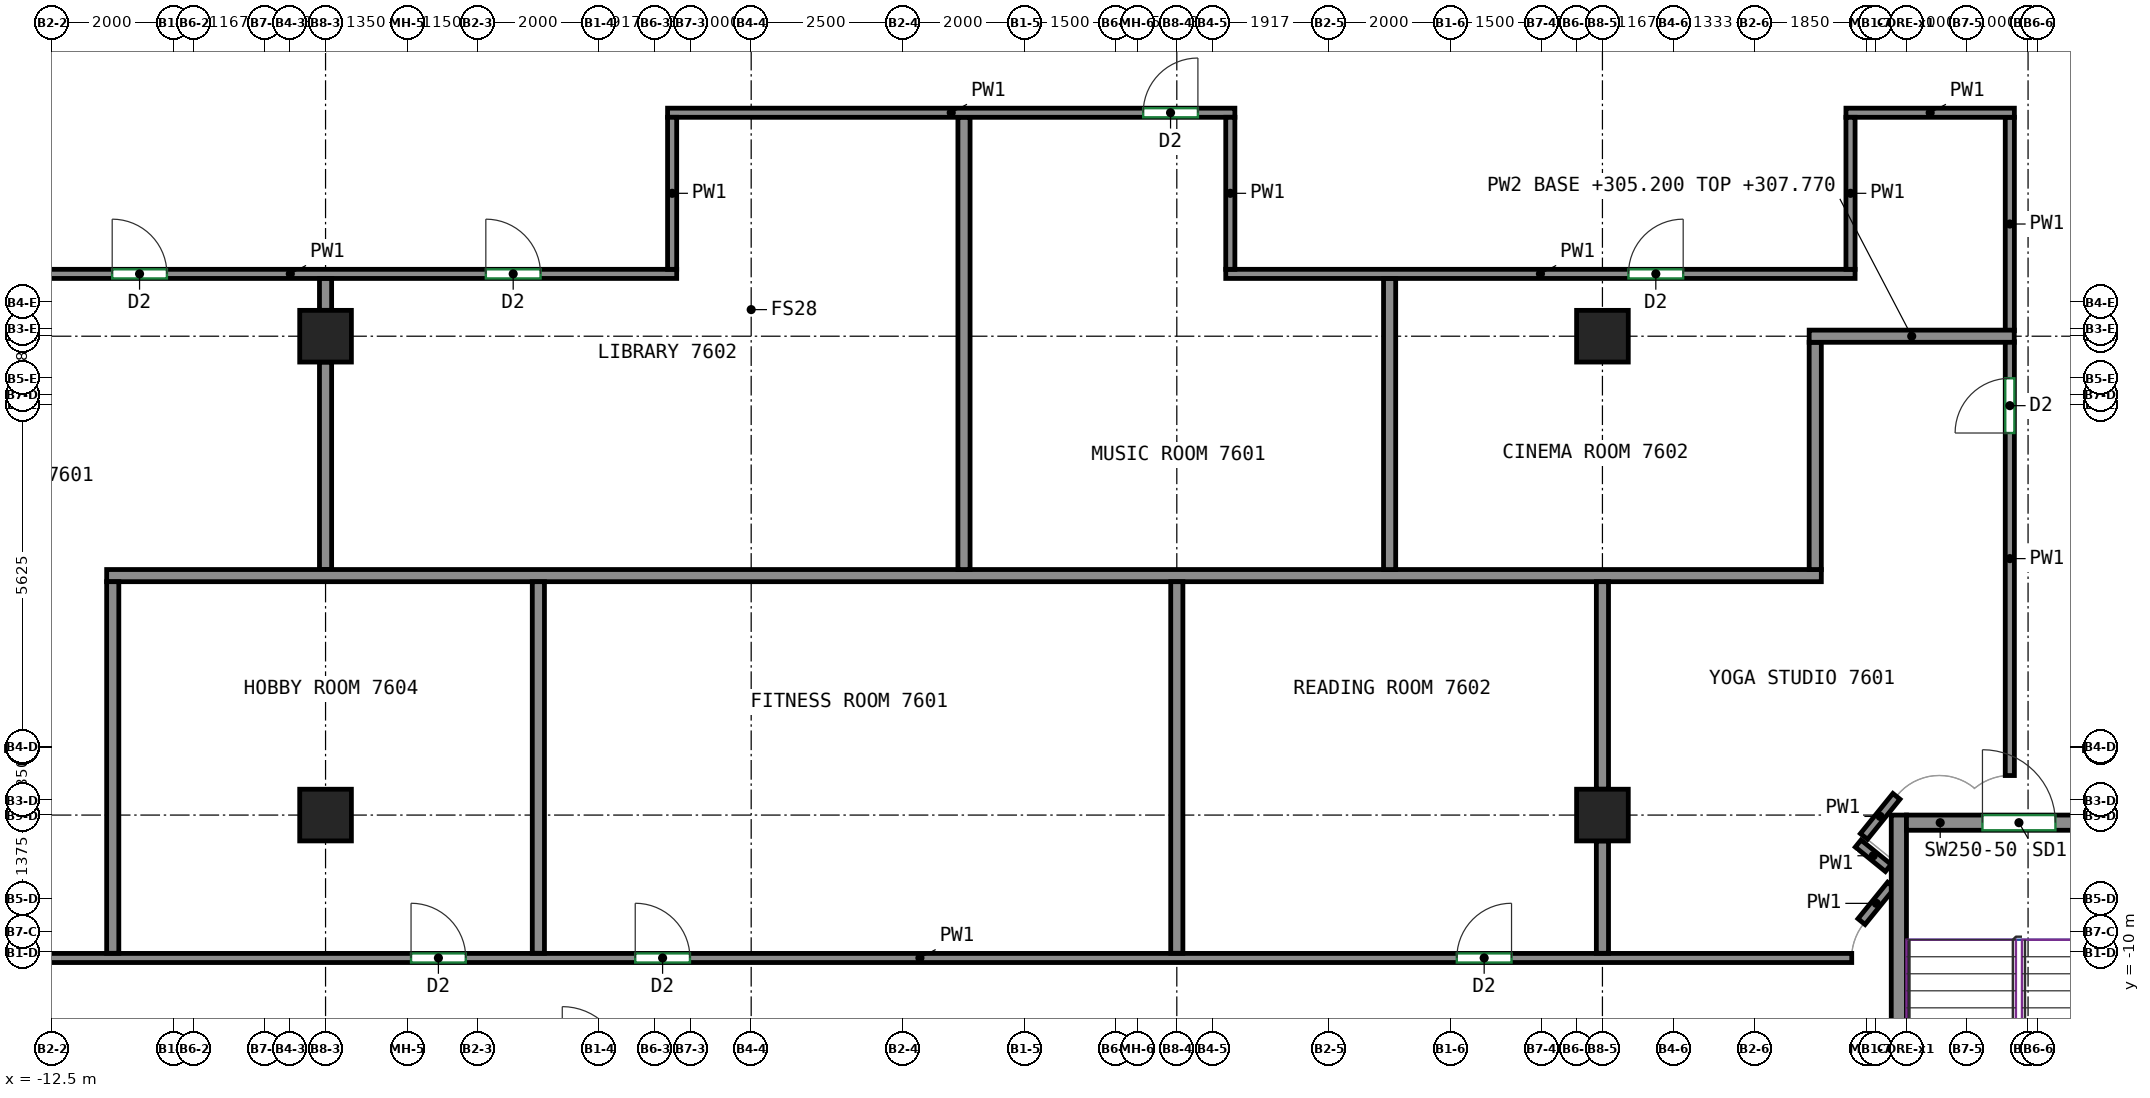
"""IFC4 building model, lengths in metres.
Left out: names, types, materials, properties, quantities, classifications, styles, units other than length and angle.
Written with IfcOpenShell. Run it as: python <this file> out.ifc"""

import sys

from ifc_helpers import new_model, si_unit, direction, frame, frame_2d, origin, origin_2d, place, context, subcontext, project, spatial, rectangle, extrude, source, transform, mapped, element, fill, save


model = new_model("IFC4")
c1 = context("Model", 3, precision=1e-05, world=origin(), true_north=direction((0.0, 1.0)))
c2 = subcontext(c1, "Body", "Model", "MODEL_VIEW")
j1 = project(units=[si_unit("LENGTHUNIT", "METRE"), si_unit("PLANEANGLEUNIT", "RADIAN")], contexts=[c1])
p1 = place(None, origin())
s1 = spatial("IfcSite", under=j1, at=p1, CompositionType="ELEMENT")
p2 = place(p1, origin())
s2 = spatial("IfcBuilding", under=s1, at=p2, CompositionType="ELEMENT")
p3 = place(p2, frame((0.0, 0.0, 305.2)))
s3 = spatial("IfcBuildingStorey", under=s2, at=p3, CompositionType="ELEMENT", Elevation=305.2)
m1 = source(origin(), c2, "Body", "SweptSolid", [
    extrude(rectangle(XDim=0.85, YDim=0.85, at=origin_2d()), origin(), (0.0, 0.0, 1.0), 3.12),
])
for number, where, z_axis, x_axis in (
    (1, (-8.0, -7.75, 0.0), (0.0, 0.0, 1.0), (1.0, 0.0, 0.0)),
    (2, (-8.0, 0.125, 0.0), (0.0, 0.0, 1.0), (1.0, 0.0, 0.0)),
    (3, (13.0, -7.75, 0.0), (0.0, 0.0, 1.0), (1.0, 0.0, 0.0)),
    (4, (13.0, 0.125, 0.0), (0.0, 0.0, 1.0), (1.0, 0.0, 0.0)),
):
    element("IfcColumn", number, at=place(p3, frame(where, z_axis=z_axis, x_axis=x_axis)), inside=s3, PredefinedType="COLUMN", context=c2, shape_type="MappedRepresentation", body=[
        mapped(m1, transform((0.0, 0.0, 0.0))),
    ])
m2 = source(origin(), c2, "Body", "SweptSolid", [
    extrude(rectangle(XDim=8.0, YDim=0.25, at=frame_2d((4.0, 0.0))), origin(), (0.0, 0.0, 1.0), 3.12),
])
p4 = place(p3, frame((17.875, -15.75, 0.0), z_axis=(0.0, 0.0, 1.0), x_axis=(0.0, 1.0, 0.0)))
e5 = element("IfcWall", 5, at=p4, inside=s3, PredefinedType="SHEAR", context=c2, shape_type="MappedRepresentation", body=[
    mapped(m2, transform((0.0, 0.0, 0.0))),
])
m3 = source(origin(), c2, "Body", "SweptSolid", [
    extrude(rectangle(XDim=3.7, YDim=0.25, at=frame_2d((1.85, 0.0))), origin(), (0.0, 0.0, 1.0), 3.12),
])
p5 = place(p3, frame((18.0, -7.875, 0.0), z_axis=(0.0, 0.0, 1.0), x_axis=(1.0, 0.0, 0.0)))
e6 = element("IfcWall", 6, at=p5, inside=s3, PredefinedType="SHEAR", context=c2, shape_type="MappedRepresentation", body=[
    mapped(m3, transform((0.0, 0.0, 0.0))),
])
p6 = place(p5, frame((1.25, 0.0, 0.0)))
e7 = element("IfcOpeningElement", 7, at=p6, cuts=e6, PredefinedType="OPENING", context=c2, shape_type="SweptSolid", body=[
    extrude(rectangle(XDim=1.2, YDim=2.1, at=frame_2d((0.6, 1.05))), frame((0.0, 0.135, 0.0), z_axis=(0.0, -1.0, 0.0), x_axis=(1.0, 0.0, 0.0)), (0.0, 0.0, 1.0), 0.27),
])
p7 = place(p3, frame((-14.935, 1.15, 0.0), z_axis=(0.0, 0.0, 1.0), x_axis=(1.0, 0.0, 0.0)))
e8 = element("IfcWall", 8, at=p7, inside=s3, PredefinedType="PARTITIONING", context=c2, shape_type="SweptSolid", body=[
    extrude(rectangle(XDim=12.71, YDim=0.15, at=frame_2d((6.355, 0.0))), origin(), (0.0, 0.0, 1.0), 3.12),
])
p8 = place(p7, frame((3.426, 0.0, 0.0)))
e9 = element("IfcOpeningElement", 9, at=p8, cuts=e8, PredefinedType="OPENING", context=c2, shape_type="SweptSolid", body=[
    extrude(rectangle(XDim=0.9, YDim=2.1, at=frame_2d((0.45, 1.05))), frame((0.0, 0.085, 0.0), z_axis=(0.0, -1.0, 0.0), x_axis=(1.0, 0.0, 0.0)), (0.0, 0.0, 1.0), 0.17),
])
p9 = place(p7, frame((9.571, 0.0, 0.0)))
e10 = element("IfcOpeningElement", 10, at=p9, cuts=e8, PredefinedType="OPENING", context=c2, shape_type="SweptSolid", body=[
    extrude(rectangle(XDim=0.9, YDim=2.1, at=frame_2d((0.45, 1.05))), frame((0.0, 0.085, 0.0), z_axis=(0.0, -1.0, 0.0), x_axis=(1.0, 0.0, 0.0)), (0.0, 0.0, 1.0), 0.17),
])
p10 = place(p3, frame((-13.55, -10.1, 0.0), z_axis=(0.0, 0.0, 1.0), x_axis=(1.0, 0.0, 0.0)))
e11 = element("IfcWall", 11, at=p10, inside=s3, PredefinedType="PARTITIONING", context=c2, shape_type="SweptSolid", body=[
    extrude(rectangle(XDim=30.65, YDim=0.15, at=frame_2d((15.325, 0.0))), origin(), (0.0, 0.0, 1.0), 3.12),
])
p11 = place(p10, frame((6.956, 0.0, 0.0)))
e12 = element("IfcOpeningElement", 12, at=p11, cuts=e11, PredefinedType="OPENING", context=c2, shape_type="SweptSolid", body=[
    extrude(rectangle(XDim=0.9, YDim=2.1, at=frame_2d((0.45, 1.05))), frame((0.0, 0.085, 0.0), z_axis=(0.0, -1.0, 0.0), x_axis=(1.0, 0.0, 0.0)), (0.0, 0.0, 1.0), 0.17),
])
p12 = place(p10, frame((10.643, 0.0, 0.0)))
e13 = element("IfcOpeningElement", 13, at=p12, cuts=e11, PredefinedType="OPENING", context=c2, shape_type="SweptSolid", body=[
    extrude(rectangle(XDim=0.9, YDim=2.1, at=frame_2d((0.45, 1.05))), frame((0.0, 0.085, 0.0), z_axis=(0.0, -1.0, 0.0), x_axis=(1.0, 0.0, 0.0)), (0.0, 0.0, 1.0), 0.17),
])
p13 = place(p10, frame((24.155, 0.0, 0.0)))
e14 = element("IfcOpeningElement", 14, at=p13, cuts=e11, PredefinedType="OPENING", context=c2, shape_type="SweptSolid", body=[
    extrude(rectangle(XDim=0.9, YDim=2.1, at=frame_2d((0.45, 1.05))), frame((0.0, 0.085, 0.0), z_axis=(0.0, -1.0, 0.0), x_axis=(1.0, 0.0, 0.0)), (0.0, 0.0, 1.0), 0.17),
])
p14 = place(p3, frame((-2.375, 3.8, 0.0), z_axis=(0.0, 0.0, 1.0), x_axis=(1.0, 0.0, 0.0)))
e15 = element("IfcWall", 15, at=p14, inside=s3, PredefinedType="PARTITIONING", context=c2, shape_type="SweptSolid", body=[
    extrude(rectangle(XDim=9.33, YDim=0.15, at=frame_2d((4.665, 0.0))), origin(), (0.0, 0.0, 1.0), 3.12),
])
p15 = place(p14, frame((7.822, 0.0, 0.0)))
e16 = element("IfcOpeningElement", 16, at=p15, cuts=e15, PredefinedType="OPENING", context=c2, shape_type="SweptSolid", body=[
    extrude(rectangle(XDim=0.9, YDim=2.1, at=frame_2d((0.45, 1.05))), frame((0.0, 0.085, 0.0), z_axis=(0.0, -1.0, 0.0), x_axis=(1.0, 0.0, 0.0)), (0.0, 0.0, 1.0), 0.17),
])
p16 = place(p3, frame((-2.3, 1.225, 0.0), z_axis=(0.0, 0.0, 1.0), x_axis=(0.0, 1.0, 0.0)))
e17 = element("IfcWall", 17, at=p16, inside=s3, PredefinedType="PARTITIONING", context=c2, shape_type="SweptSolid", body=[
    extrude(rectangle(XDim=2.5, YDim=0.15, at=frame_2d((1.25, 0.0))), origin(), (0.0, 0.0, 1.0), 3.12),
])
p17 = place(p3, frame((6.805, 1.15, 0.0), z_axis=(0.0, 0.0, 1.0), x_axis=(1.0, 0.0, 0.0)))
e18 = element("IfcWall", 18, at=p17, inside=s3, PredefinedType="PARTITIONING", context=c2, shape_type="SweptSolid", body=[
    extrude(rectangle(XDim=10.35, YDim=0.15, at=frame_2d((5.175, 0.0))), origin(), (0.0, 0.0, 1.0), 3.12),
])
p18 = place(p17, frame((6.623, 0.0, 0.0)))
e19 = element("IfcOpeningElement", 19, at=p18, cuts=e18, PredefinedType="OPENING", context=c2, shape_type="SweptSolid", body=[
    extrude(rectangle(XDim=0.9, YDim=2.1, at=frame_2d((0.45, 1.05))), frame((0.0, 0.085, 0.0), z_axis=(0.0, -1.0, 0.0), x_axis=(1.0, 0.0, 0.0)), (0.0, 0.0, 1.0), 0.17),
])
p19 = place(p3, frame((6.88, 3.725, 0.0), z_axis=(0.0, 0.0, 1.0), x_axis=(0.0, -1.0, 0.0)))
e20 = element("IfcWall", 20, at=p19, inside=s3, PredefinedType="PARTITIONING", context=c2, shape_type="SweptSolid", body=[
    extrude(rectangle(XDim=2.5, YDim=0.15, at=frame_2d((1.25, 0.0))), origin(), (0.0, 0.0, 1.0), 3.12),
])
p20 = place(p3, frame((17.748, -8.902, 0.0), z_axis=(0.0, 0.0, 1.0), x_axis=(-0.630342797145, -0.776316918589, 0.0)))
e21 = element("IfcWall", 21, at=p20, inside=s3, PredefinedType="PARTITIONING", context=c2, shape_type="SweptSolid", body=[
    extrude(rectangle(XDim=0.773, YDim=0.15, at=frame_2d((0.386, 0.0))), origin(), (0.0, 0.0, 1.0), 3.12),
])
p21 = place(p3, frame((17.206, -8.218, 0.0), z_axis=(0.0, 0.0, 1.0), x_axis=(0.776102288291, -0.630607039376, 0.0)))
e22 = element("IfcWall", 22, at=p21, inside=s3, PredefinedType="PARTITIONING", context=c2, shape_type="SweptSolid", body=[
    extrude(rectangle(XDim=0.638, YDim=0.15, at=frame_2d((0.319, 0.0))), origin(), (0.0, 0.0, 1.0), 3.12),
])
p22 = place(p3, frame((17.835, -7.442, 0.0), z_axis=(0.0, 0.0, 1.0), x_axis=(-0.628859024249, -0.777519342281, 0.0)))
e23 = element("IfcWall", 23, at=p22, inside=s3, PredefinedType="PARTITIONING", context=c2, shape_type="SweptSolid", body=[
    extrude(rectangle(XDim=0.849, YDim=0.15, at=frame_2d((0.425, 0.0))), origin(), (0.0, 0.0, 1.0), 3.12),
])
p23 = place(p3, frame((19.7, -7.1, 0.0), z_axis=(0.0, 0.0, 1.0), x_axis=(0.0, 1.0, 0.0)))
e24 = element("IfcWall", 24, at=p23, inside=s3, PredefinedType="PARTITIONING", context=c2, shape_type="SweptSolid", body=[
    extrude(rectangle(XDim=7.135, YDim=0.15, at=frame_2d((3.567, 0.0))), origin(), (0.0, 0.0, 1.0), 3.12),
])
p24 = place(p23, frame((5.633, 0.0, 0.0)))
e25 = element("IfcOpeningElement", 25, at=p24, cuts=e24, PredefinedType="OPENING", context=c2, shape_type="SweptSolid", body=[
    extrude(rectangle(XDim=0.9, YDim=2.1, at=frame_2d((0.45, 1.05))), frame((0.0, 0.085, 0.0), z_axis=(0.0, -1.0, 0.0), x_axis=(1.0, 0.0, 0.0)), (0.0, 0.0, 1.0), 0.17),
])
p25 = place(p3, frame((19.7, 0.215, 0.0), z_axis=(0.0, 0.0, 1.0), x_axis=(0.0, 1.0, 0.0)))
e26 = element("IfcWall", 26, at=p25, inside=s3, PredefinedType="PARTITIONING", context=c2, shape_type="SweptSolid", body=[
    extrude(rectangle(XDim=3.51, YDim=0.15, at=frame_2d((1.755, 0.0))), origin(), (0.0, 0.0, 1.0), 3.12),
])
p26 = place(p3, frame((17.005, 3.8, 0.0), z_axis=(0.0, 0.0, 1.0), x_axis=(1.0, 0.0, 0.0)))
e27 = element("IfcWall", 27, at=p26, inside=s3, PredefinedType="PARTITIONING", context=c2, shape_type="SweptSolid", body=[
    extrude(rectangle(XDim=2.77, YDim=0.15, at=frame_2d((1.385, 0.0))), origin(), (0.0, 0.0, 1.0), 3.12),
])
p27 = place(p3, frame((17.08, 1.225, 0.0), z_axis=(0.0, 0.0, 1.0), x_axis=(0.0, 1.0, 0.0)))
e28 = element("IfcWall", 28, at=p27, inside=s3, PredefinedType="PARTITIONING", context=c2, shape_type="SweptSolid", body=[
    extrude(rectangle(XDim=2.5, YDim=0.15, at=frame_2d((1.25, 0.0))), origin(), (0.0, 0.0, 1.0), 3.12),
])
p28 = place(p3, frame((-8.0, 0.55, 0.0), z_axis=(0.0, 0.0, 1.0), x_axis=(0.0, 1.0, 0.0)))
e29 = element("IfcWall", 29, at=p28, inside=s3, PredefinedType="PARTITIONING", context=c2, shape_type="SweptSolid", body=[
    extrude(rectangle(XDim=0.523, YDim=0.2, at=frame_2d((0.261, 0.0))), origin(), (0.0, 0.0, 1.0), 3.12),
])
p29 = place(p3, frame((-8.0, -3.712, 0.0), z_axis=(0.0, 0.0, 1.0), x_axis=(0.0, 1.0, 0.0)))
e30 = element("IfcWall", 30, at=p29, inside=s3, PredefinedType="PARTITIONING", context=c2, shape_type="SweptSolid", body=[
    extrude(rectangle(XDim=3.412, YDim=0.2, at=frame_2d((1.706, 0.0))), origin(), (0.0, 0.0, 1.0), 3.12),
])
p30 = place(p3, frame((-11.6, -3.812, 0.0), z_axis=(0.0, 0.0, 1.0), x_axis=(1.0, 0.0, 0.0)))
e31 = element("IfcWall", 31, at=p30, inside=s3, PredefinedType="PARTITIONING", context=c2, shape_type="SweptSolid", body=[
    extrude(rectangle(XDim=28.2, YDim=0.2, at=frame_2d((14.1, 0.0))), origin(), (0.0, 0.0, 1.0), 3.12),
])
p31 = place(p3, frame((-11.5, -10.023, 0.0), z_axis=(0.0, 0.0, 1.0), x_axis=(0.0, 1.0, 0.0)))
e32 = element("IfcWall", 32, at=p31, inside=s3, PredefinedType="PARTITIONING", context=c2, shape_type="SweptSolid", body=[
    extrude(rectangle(XDim=6.111, YDim=0.2, at=frame_2d((3.055, 0.0))), origin(), (0.0, 0.0, 1.0), 3.12),
])
p32 = place(p3, frame((2.5, -3.712, 0.0), z_axis=(0.0, 0.0, 1.0), x_axis=(0.0, 1.0, 0.0)))
e33 = element("IfcWall", 33, at=p32, inside=s3, PredefinedType="PARTITIONING", context=c2, shape_type="SweptSolid", body=[
    extrude(rectangle(XDim=7.435, YDim=0.2, at=frame_2d((3.717, 0.0))), origin(), (0.0, 0.0, 1.0), 3.12),
])
for number, where, z_axis, x_axis in (
    (34, (-4.5, -10.023, 0.0), (0.0, 0.0, 1.0), (0.0, 1.0, 0.0)),
    (35, (6.0, -10.023, 0.0), (0.0, 0.0, 1.0), (0.0, 1.0, 0.0)),
):
    element("IfcWall", number, at=place(p3, frame(where, z_axis=z_axis, x_axis=x_axis)), inside=s3, PredefinedType="PARTITIONING", context=c2, shape_type="SweptSolid", body=[
        extrude(rectangle(XDim=6.111, YDim=0.2, at=frame_2d((3.055, 0.0))), origin(), (0.0, 0.0, 1.0), 3.12),
    ])
p33 = place(p3, frame((9.5, -3.712, 0.0), z_axis=(0.0, 0.0, 1.0), x_axis=(0.0, 1.0, 0.0)))
e36 = element("IfcWall", 36, at=p33, inside=s3, PredefinedType="PARTITIONING", context=c2, shape_type="SweptSolid", body=[
    extrude(rectangle(XDim=4.785, YDim=0.2, at=frame_2d((2.393, 0.0))), origin(), (0.0, 0.0, 1.0), 3.12),
])
p34 = place(p3, frame((13.0, -7.325, 0.0), z_axis=(0.0, 0.0, 1.0), x_axis=(0.0, 1.0, 0.0)))
e37 = element("IfcWall", 37, at=p34, inside=s3, PredefinedType="PARTITIONING", context=c2, shape_type="SweptSolid", body=[
    extrude(rectangle(XDim=3.413, YDim=0.2, at=frame_2d((1.707, 0.0))), origin(), (0.0, 0.0, 1.0), 3.12),
])
p35 = place(p3, frame((13.0, -10.023, 0.0), z_axis=(0.0, 0.0, 1.0), x_axis=(0.0, 1.0, 0.0)))
e38 = element("IfcWall", 38, at=p35, inside=s3, PredefinedType="PARTITIONING", context=c2, shape_type="SweptSolid", body=[
    extrude(rectangle(XDim=1.848, YDim=0.2, at=frame_2d((0.924, 0.0))), origin(), (0.0, 0.0, 1.0), 3.12),
])
p36 = place(p3, frame((16.5, -3.712, 0.0), z_axis=(0.0, 0.0, 1.0), x_axis=(0.0, 1.0, 0.0)))
e39 = element("IfcWall", 39, at=p36, inside=s3, PredefinedType="PARTITIONING", context=c2, shape_type="SweptSolid", body=[
    extrude(rectangle(XDim=3.737, YDim=0.2, at=frame_2d((1.868, 0.0))), origin(), (0.0, 0.0, 1.0), 3.12),
])
p37 = place(p3, frame((19.773, 0.125, 0.0), z_axis=(0.0, 0.0, 1.0), x_axis=(-1.0, 0.0, 0.0)))
e40 = element("IfcWall", 40, at=p37, inside=s3, PredefinedType="PARTITIONING", context=c2, shape_type="SweptSolid", body=[
    extrude(rectangle(XDim=3.373, YDim=0.2, at=frame_2d((1.687, 0.0))), origin(), (0.0, 0.0, 1.0), 2.57),
])
p38 = place(p6, origin())
e41 = element("IfcDoor", 41, at=p38, inside=s3, OperationType="DOUBLE_DOOR_SINGLE_SWING", PredefinedType="DOOR", context=c2, shape_type="SweptSolid", body=[
    extrude(rectangle(XDim=1.2, YDim=2.1, at=frame_2d((0.6, 1.05))), frame((0.0, 0.025, 0.0), z_axis=(0.0, -1.0, 0.0), x_axis=(1.0, 0.0, 0.0)), (0.0, 0.0, 1.0), 0.05),
])
fill(e7, e41)
p39 = place(p11, origin())
e42 = element("IfcDoor", 42, at=p39, inside=s3, OperationType="SINGLE_SWING_LEFT", PredefinedType="DOOR", context=c2, shape_type="SweptSolid", body=[
    extrude(rectangle(XDim=0.9, YDim=2.1, at=frame_2d((0.45, 1.05))), frame((0.0, 0.025, 0.0), z_axis=(0.0, -1.0, 0.0), x_axis=(1.0, 0.0, 0.0)), (0.0, 0.0, 1.0), 0.05),
])
fill(e12, e42)
p40 = place(p12, origin())
e43 = element("IfcDoor", 43, at=p40, inside=s3, OperationType="SINGLE_SWING_LEFT", PredefinedType="DOOR", context=c2, shape_type="SweptSolid", body=[
    extrude(rectangle(XDim=0.9, YDim=2.1, at=frame_2d((0.45, 1.05))), frame((0.0, 0.025, 0.0), z_axis=(0.0, -1.0, 0.0), x_axis=(1.0, 0.0, 0.0)), (0.0, 0.0, 1.0), 0.05),
])
fill(e13, e43)
p41 = place(p13, origin())
e44 = element("IfcDoor", 44, at=p41, inside=s3, OperationType="SINGLE_SWING_RIGHT", PredefinedType="DOOR", context=c2, shape_type="SweptSolid", body=[
    extrude(rectangle(XDim=0.9, YDim=2.1, at=frame_2d((0.45, 1.05))), frame((0.0, 0.025, 0.0), z_axis=(0.0, -1.0, 0.0), x_axis=(1.0, 0.0, 0.0)), (0.0, 0.0, 1.0), 0.05),
])
fill(e14, e44)
p42 = place(p24, origin())
e45 = element("IfcDoor", 45, at=p42, inside=s3, OperationType="SINGLE_SWING_LEFT", PredefinedType="DOOR", context=c2, shape_type="SweptSolid", body=[
    extrude(rectangle(XDim=0.9, YDim=2.1, at=frame_2d((0.45, 1.05))), frame((0.0, 0.025, 0.0), z_axis=(0.0, -1.0, 0.0), x_axis=(1.0, 0.0, 0.0)), (0.0, 0.0, 1.0), 0.05),
])
fill(e25, e45)
p43 = place(p8, origin())
e46 = element("IfcDoor", 46, at=p43, inside=s3, OperationType="SINGLE_SWING_LEFT", PredefinedType="DOOR", context=c2, shape_type="SweptSolid", body=[
    extrude(rectangle(XDim=0.9, YDim=2.1, at=frame_2d((0.45, 1.05))), frame((0.0, 0.025, 0.0), z_axis=(0.0, -1.0, 0.0), x_axis=(1.0, 0.0, 0.0)), (0.0, 0.0, 1.0), 0.05),
])
fill(e9, e46)
p44 = place(p9, origin())
e47 = element("IfcDoor", 47, at=p44, inside=s3, OperationType="SINGLE_SWING_LEFT", PredefinedType="DOOR", context=c2, shape_type="SweptSolid", body=[
    extrude(rectangle(XDim=0.9, YDim=2.1, at=frame_2d((0.45, 1.05))), frame((0.0, 0.025, 0.0), z_axis=(0.0, -1.0, 0.0), x_axis=(1.0, 0.0, 0.0)), (0.0, 0.0, 1.0), 0.05),
])
fill(e10, e47)
p45 = place(p18, origin())
e48 = element("IfcDoor", 48, at=p45, inside=s3, OperationType="SINGLE_SWING_RIGHT", PredefinedType="DOOR", context=c2, shape_type="SweptSolid", body=[
    extrude(rectangle(XDim=0.9, YDim=2.1, at=frame_2d((0.45, 1.05))), frame((0.0, 0.025, 0.0), z_axis=(0.0, -1.0, 0.0), x_axis=(1.0, 0.0, 0.0)), (0.0, 0.0, 1.0), 0.05),
])
fill(e19, e48)
p46 = place(p15, origin())
e49 = element("IfcDoor", 49, at=p46, inside=s3, OperationType="SINGLE_SWING_RIGHT", PredefinedType="DOOR", context=c2, shape_type="SweptSolid", body=[
    extrude(rectangle(XDim=0.9, YDim=2.1, at=frame_2d((0.45, 1.05))), frame((0.0, 0.025, 0.0), z_axis=(0.0, -1.0, 0.0), x_axis=(1.0, 0.0, 0.0)), (0.0, 0.0, 1.0), 0.05),
])
fill(e16, e49)
save(model, sys.argv[1])
